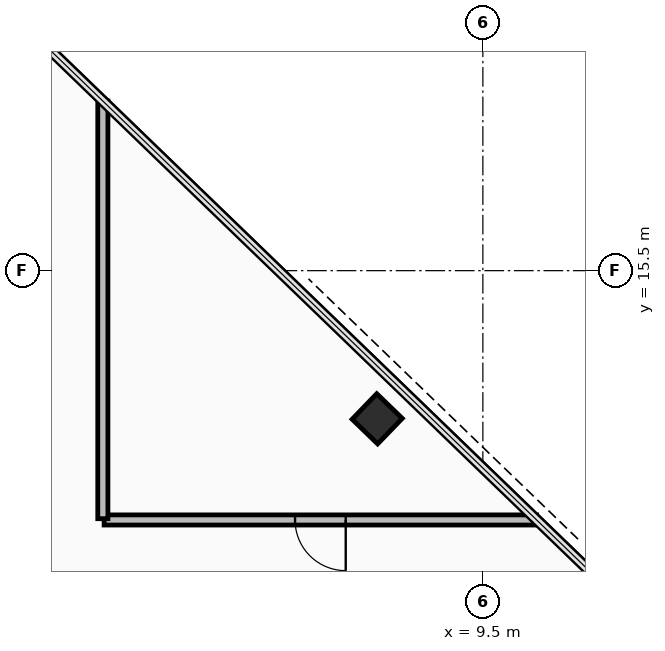
"""IFC4 building model, lengths in metres.
Left out: names, types, materials, properties, quantities, classifications, styles, units other than length and angle.
Written with IfcOpenShell. Run it as: python <this file> out.ifc"""

import sys

from ifc_helpers import new_model, si_unit, direction, frame, frame_2d, origin, origin_2d, place, context, subcontext, project, spatial, rectangle, hollow_rectangle, extrude, element, fill, save


model = new_model("IFC4")
c1 = context("Model", 3, precision=1e-05, world=origin(), true_north=direction((0.0, 1.0)))
c2 = subcontext(c1, "Body", "Model", "MODEL_VIEW")
j1 = project(units=[si_unit("LENGTHUNIT", "METRE"), si_unit("PLANEANGLEUNIT", "RADIAN")], contexts=[c1])
p1 = place(None, origin())
s1 = spatial("IfcSite", under=j1, at=p1, CompositionType="ELEMENT")
p2 = place(p1, origin())
s2 = spatial("IfcBuilding", under=s1, at=p2, CompositionType="ELEMENT")
p3 = place(p2, frame((0.0, 0.0, 96.9)))
s3 = spatial("IfcBuildingStorey", under=s2, at=p3, CompositionType="ELEMENT", Elevation=96.9)
p4 = place(p3, frame((7.415, 12.576, 0.0), z_axis=(0.0, 0.0, 1.0), x_axis=(-0.719339800339, 0.694658370459, 0.0)))
e1 = element("IfcColumn", 1, at=p4, inside=s3, PredefinedType="COLUMN", context=c2, shape_type="SweptSolid", body=[
    extrude(hollow_rectangle(XDim=0.7, YDim=0.7, WallThickness=0.04, at=origin_2d()), origin(), (0.0, 0.0, 1.0), 3.6),
])
p5 = place(p3, frame((10.561, 10.58, 0.0), z_axis=(0.0, 0.0, 1.0), x_axis=(-1.0, 0.0, 0.0)))
e2 = element("IfcWall", 2, at=p5, inside=s3, PredefinedType="PARTITIONING", context=c2, shape_type="SweptSolid", body=[
    extrude(rectangle(XDim=8.536, YDim=0.2, at=frame_2d((4.268, 0.0))), origin(), (0.0, 0.0, 1.0), 2.605),
])
p6 = place(p5, frame((3.768, 0.0, 0.0)))
e3 = element("IfcOpeningElement", 3, at=p6, cuts=e2, PredefinedType="OPENING", context=c2, shape_type="SweptSolid", body=[
    extrude(rectangle(XDim=1.0, YDim=2.15, at=frame_2d((0.5, 1.075))), frame((0.0, 0.11, 0.0), z_axis=(0.0, -1.0, 0.0), x_axis=(1.0, 0.0, 0.0)), (0.0, 0.0, 1.0), 0.22),
])
p7 = place(p3, frame((2.0, 10.605, 0.0), z_axis=(0.0, 0.0, 1.0), x_axis=(0.0, 1.0, 0.0)))
e4 = element("IfcWall", 4, at=p7, inside=s3, PredefinedType="PARTITIONING", context=c2, shape_type="SweptSolid", body=[
    extrude(rectangle(XDim=8.242, YDim=0.2, at=frame_2d((4.121, 0.0))), origin(), (0.0, 0.0, 1.0), 2.605),
])
p8 = place(p6, origin())
e5 = element("IfcDoor", 5, at=p8, inside=s3, OperationType="SINGLE_SWING_RIGHT", PredefinedType="DOOR", context=c2, shape_type="SweptSolid", body=[
    extrude(rectangle(XDim=1.0, YDim=2.15, at=frame_2d((0.5, 1.075))), frame((0.0, 0.025, 0.0), z_axis=(0.0, -1.0, 0.0), x_axis=(1.0, 0.0, 0.0)), (0.0, 0.0, 1.0), 0.05),
])
fill(e3, e5)
save(model, sys.argv[1])
